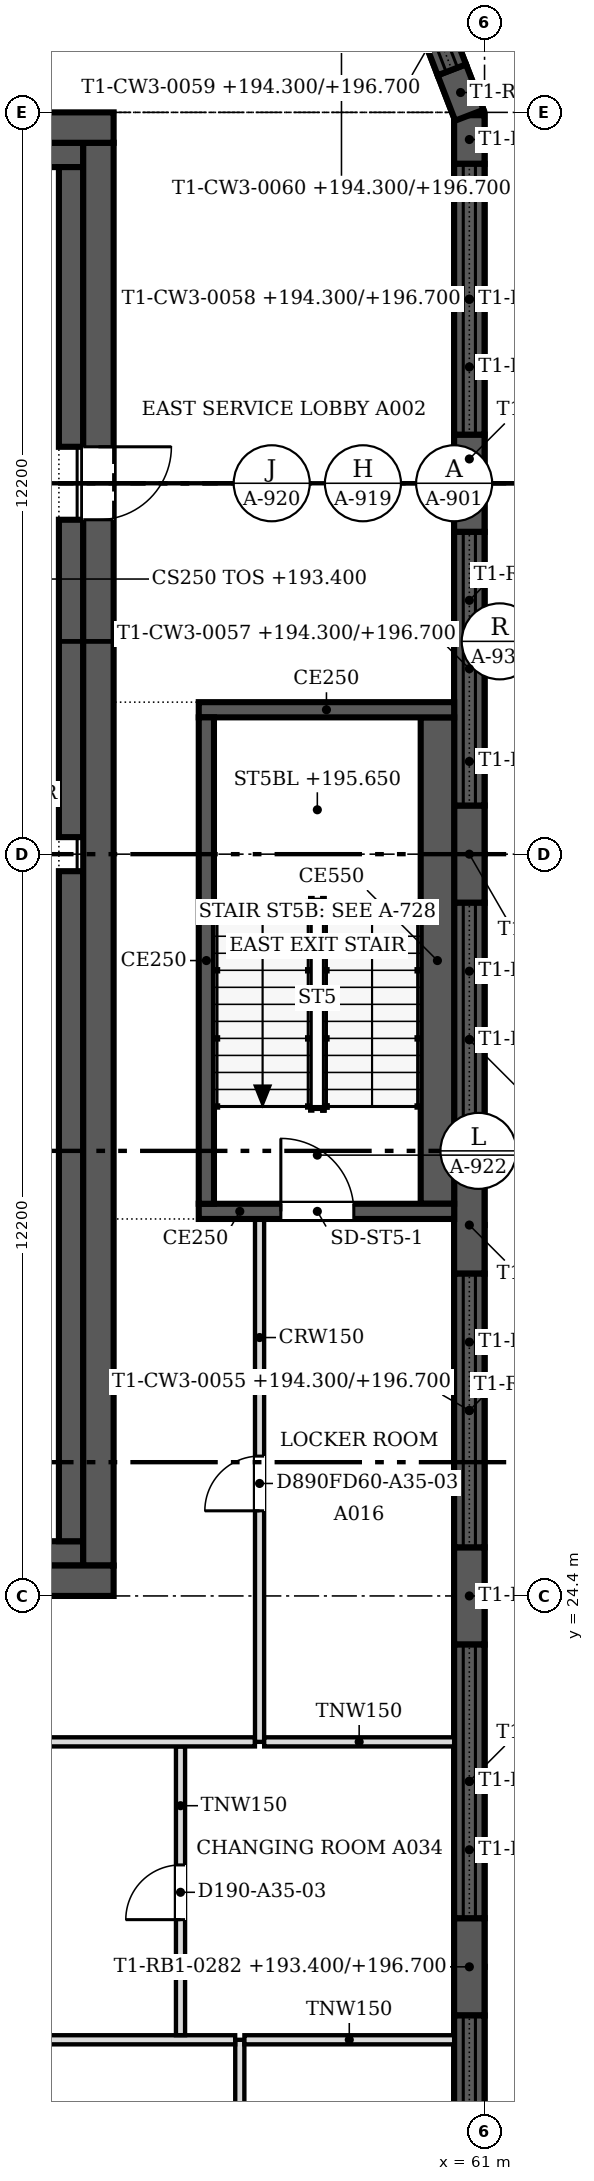
"""IFC4 building model, lengths in metres.
Left out: names, types, materials, properties, quantities, classifications, styles, units other than length and angle.
Written with IfcOpenShell. Run it as: python <this file> out.ifc"""

import sys

from ifc_helpers import new_model, si_unit, direction, frame, frame_2d, origin, place, context, subcontext, project, spatial, polyline, rectangle, outline, extrude, faceted_brep, source, transform, mapped, element, fill, save


model = new_model("IFC4")
c1 = context("Model", 3, precision=1e-05, world=origin(), true_north=direction((0.0, 1.0)))
c2 = subcontext(c1, "Body", "Model", "MODEL_VIEW")
j1 = project(units=[si_unit("LENGTHUNIT", "METRE"), si_unit("PLANEANGLEUNIT", "RADIAN")], contexts=[c1])
p1 = place(None, origin())
s1 = spatial("IfcSite", under=j1, at=p1, CompositionType="ELEMENT")
p2 = place(p1, origin())
s2 = spatial("IfcBuilding", under=s1, at=p2, CompositionType="ELEMENT")
p3 = place(p2, frame((0.0, 0.0, 193.4)))
s3 = spatial("IfcBuildingStorey", under=s2, at=p3, CompositionType="ELEMENT", Elevation=193.4)
m1 = source(origin(), c2, "Body", "SweptSolid", [
    extrude(outline(polyline([(0.0, 0.0), (1.6, 0.0), (1.6, 3.3), (0.0, 3.3), (0.0, 0.0)])), frame((0.0, 0.25, 0.0), z_axis=(0.0, -1.0, 0.0), x_axis=(1.0, 0.0, 0.0)), (0.0, 0.0, 1.0), 0.5),
])
p4 = place(p3, frame((60.75, 17.5, 0.0), z_axis=(0.0, 0.0, 1.0), x_axis=(0.0, 1.0, 0.0)))
e1 = element("IfcWall", 1, at=p4, inside=s3, PredefinedType="SOLIDWALL", context=c2, shape_type="MappedRepresentation", body=[
    mapped(m1, transform((0.0, 0.0, 0.0), scale=1.0)),
])
m2 = source(origin(), c2, "Body", "Brep", [
    faceted_brep([(0.0, -0.25, 0.0), (1.6, -0.25, 0.0), (1.6, -0.25, 3.3), (0.0, -0.25, 3.3), (0.0, 0.25, 3.3), (1.6, 0.25, 3.3), (1.6, 0.25, 0.0), (0.0, 0.25, 0.0)], [[[0, 1, 2, 3]], [[4, 5, 6, 7]], [[7, 6, 1, 0]], [[5, 4, 3, 2]], [[4, 7, 0, 3]], [[1, 6, 5, 2]]]),
])
p5 = place(p3, frame((60.75, 23.6, 0.0), z_axis=(0.0, 0.0, 1.0), x_axis=(0.0, 1.0, 0.0)))
e2 = element("IfcWall", 2, at=p5, inside=s3, PredefinedType="SOLIDWALL", context=c2, shape_type="MappedRepresentation", body=[
    mapped(m2, transform((0.0, 0.0, 0.0), scale=1.0)),
])
p6 = place(p3, frame((60.75, 29.7, 0.0), z_axis=(0.0, 0.0, 1.0), x_axis=(0.0, 1.0, 0.0)))
e3 = element("IfcWall", 3, at=p6, inside=s3, PredefinedType="SOLIDWALL", context=c2, shape_type="MappedRepresentation", body=[
    mapped(m1, transform((0.0, 0.0, 0.0), scale=1.0)),
])
p7 = place(p3, frame((60.75, 35.8, 0.0), z_axis=(0.0, 0.0, 1.0), x_axis=(0.0, 1.0, 0.0)))
e4 = element("IfcWall", 4, at=p7, inside=s3, PredefinedType="SOLIDWALL", context=c2, shape_type="MappedRepresentation", body=[
    mapped(m2, transform((0.0, 0.0, 0.0), scale=1.0)),
])
p8 = place(p3, frame((60.75, 41.9, 0.0), z_axis=(0.0, 0.0, 1.0), x_axis=(0.0, 1.0, 0.0)))
e5 = element("IfcWall", 5, at=p8, inside=s3, PredefinedType="SOLIDWALL", context=c2, shape_type="MappedRepresentation", body=[
    mapped(m1, transform((0.0, 0.0, 0.0), scale=1.0)),
])
m3 = source(origin(), c2, "Body", "Brep", [
    faceted_brep([(0.0, -0.25, 0.0), (0.8, -0.25, 0.0), (0.8, -0.25, 3.3), (0.0, -0.25, 3.3), (0.0, 0.25, 3.3), (0.753, 0.25, 3.3), (0.753, 0.25, 0.0), (0.0, 0.25, 0.0), (0.8, -0.0, 0.0), (0.8, -0.0, 3.3)], [[[0, 1, 2, 3]], [[4, 5, 6, 7]], [[7, 6, 8, 1, 0]], [[9, 2, 1, 8]], [[5, 4, 3, 2, 9]], [[4, 7, 0, 3]], [[8, 6, 5, 9]]]),
])
p9 = place(p3, frame((60.75, 47.953, 0.0), z_axis=(0.0, 0.0, 1.0), x_axis=(0.0, 1.0, 0.0)))
e6 = element("IfcWall", 6, at=p9, inside=s3, PredefinedType="SOLIDWALL", context=c2, shape_type="MappedRepresentation", body=[
    mapped(m3, transform((0.0, 0.0, 0.0), scale=1.0)),
])
m4 = source(origin(), c2, "Body", "SweptSolid", [
    extrude(outline(polyline([(0.0, 0.0), (4.5, 0.0), (4.5, 0.9), (0.0, 0.9), (0.0, 0.0)])), frame((0.0, 0.25, 0.0), z_axis=(0.0, -1.0, 0.0), x_axis=(1.0, 0.0, 0.0)), (0.0, 0.0, 1.0), 0.5),
])
p10 = place(p3, frame((60.75, 13.0, 0.0), z_axis=(0.0, 0.0, 1.0), x_axis=(0.0, 1.0, 0.0)))
e7 = element("IfcWall", 7, at=p10, inside=s3, PredefinedType="SOLIDWALL", context=c2, shape_type="MappedRepresentation", body=[
    mapped(m4, transform((0.0, 0.0, 0.0), scale=1.0)),
])
m5 = source(origin(), c2, "Body", "SweptSolid", [
    extrude(outline(polyline([(0.0, 0.0), (6.1, 0.0), (6.1, 1.2), (0.0, 1.2), (0.0, 0.0)])), frame((0.0, 0.25, 0.0), z_axis=(0.0, -1.0, 0.0), x_axis=(1.0, 0.0, 0.0)), (0.0, 0.0, 1.0), 0.5),
])
p11 = place(p3, frame((60.75, 12.2, 3.3), z_axis=(0.0, 0.0, 1.0), x_axis=(0.0, 1.0, 0.0)))
e8 = element("IfcWall", 8, at=p11, inside=s3, PredefinedType="SOLIDWALL", context=c2, shape_type="MappedRepresentation", body=[
    mapped(m5, transform((0.0, 0.0, 0.0), scale=1.0)),
])
p12 = place(p3, frame((60.75, 19.1, 0.0), z_axis=(0.0, 0.0, 1.0), x_axis=(0.0, 1.0, 0.0)))
e9 = element("IfcWall", 9, at=p12, inside=s3, PredefinedType="SOLIDWALL", context=c2, shape_type="MappedRepresentation", body=[
    mapped(m4, transform((0.0, 0.0, 0.0), scale=1.0)),
])
m6 = source(origin(), c2, "Body", "Brep", [
    faceted_brep([(0.0, -0.25, 0.0), (6.1, -0.25, 0.0), (6.1, -0.25, 1.2), (0.0, -0.25, 1.2), (0.0, 0.25, 1.2), (6.1, 0.25, 1.2), (6.1, 0.25, 0.0), (0.0, 0.25, 0.0)], [[[0, 1, 2, 3]], [[4, 5, 6, 7]], [[7, 6, 1, 0]], [[5, 4, 3, 2]], [[4, 7, 0, 3]], [[1, 6, 5, 2]]]),
])
p13 = place(p3, frame((60.75, 18.3, 3.3), z_axis=(0.0, 0.0, 1.0), x_axis=(0.0, 1.0, 0.0)))
e10 = element("IfcWall", 10, at=p13, inside=s3, PredefinedType="SOLIDWALL", context=c2, shape_type="MappedRepresentation", body=[
    mapped(m6, transform((0.0, 0.0, 0.0), scale=1.0)),
])
p14 = place(p3, frame((60.75, 25.2, 0.0), z_axis=(0.0, 0.0, 1.0), x_axis=(0.0, 1.0, 0.0)))
e11 = element("IfcWall", 11, at=p14, inside=s3, PredefinedType="SOLIDWALL", context=c2, shape_type="MappedRepresentation", body=[
    mapped(m4, transform((0.0, 0.0, 0.0), scale=1.0)),
])
p15 = place(p3, frame((60.75, 24.4, 3.3), z_axis=(0.0, 0.0, 1.0), x_axis=(0.0, 1.0, 0.0)))
e12 = element("IfcWall", 12, at=p15, inside=s3, PredefinedType="SOLIDWALL", context=c2, shape_type="MappedRepresentation", body=[
    mapped(m5, transform((0.0, 0.0, 0.0), scale=1.0)),
])
p16 = place(p3, frame((60.75, 31.3, 0.0), z_axis=(0.0, 0.0, 1.0), x_axis=(0.0, 1.0, 0.0)))
e13 = element("IfcWall", 13, at=p16, inside=s3, PredefinedType="SOLIDWALL", context=c2, shape_type="MappedRepresentation", body=[
    mapped(m4, transform((0.0, 0.0, 0.0), scale=1.0)),
])
p17 = place(p3, frame((60.75, 30.5, 3.3), z_axis=(0.0, 0.0, 1.0), x_axis=(0.0, 1.0, 0.0)))
e14 = element("IfcWall", 14, at=p17, inside=s3, PredefinedType="SOLIDWALL", context=c2, shape_type="MappedRepresentation", body=[
    mapped(m5, transform((0.0, 0.0, 0.0), scale=1.0)),
])
p18 = place(p3, frame((60.75, 37.4, 0.0), z_axis=(0.0, 0.0, 1.0), x_axis=(0.0, 1.0, 0.0)))
e15 = element("IfcWall", 15, at=p18, inside=s3, PredefinedType="SOLIDWALL", context=c2, shape_type="MappedRepresentation", body=[
    mapped(m4, transform((0.0, 0.0, 0.0), scale=1.0)),
])
p19 = place(p3, frame((60.75, 36.6, 3.3), z_axis=(0.0, 0.0, 1.0), x_axis=(0.0, 1.0, 0.0)))
e16 = element("IfcWall", 16, at=p19, inside=s3, PredefinedType="SOLIDWALL", context=c2, shape_type="MappedRepresentation", body=[
    mapped(m6, transform((0.0, 0.0, 0.0), scale=1.0)),
])
m7 = source(origin(), c2, "Body", "SweptSolid", [
    extrude(outline(polyline([(0.0, 0.0), (4.453, 0.0), (4.453, 0.9), (0.0, 0.9), (0.0, 0.0)])), frame((0.0, 0.25, 0.0), z_axis=(0.0, -1.0, 0.0), x_axis=(1.0, 0.0, 0.0)), (0.0, 0.0, 1.0), 0.5),
])
p20 = place(p3, frame((60.75, 43.5, 0.0), z_axis=(0.0, 0.0, 1.0), x_axis=(0.0, 1.0, 0.0)))
e17 = element("IfcWall", 17, at=p20, inside=s3, PredefinedType="SOLIDWALL", context=c2, shape_type="MappedRepresentation", body=[
    mapped(m7, transform((0.0, 0.0, 0.0), scale=1.0)),
])
m8 = source(origin(), c2, "Body", "Brep", [
    faceted_brep([(0.0, -0.25, 0.0), (6.053, -0.25, 0.0), (6.053, -0.25, 1.2), (0.0, -0.25, 1.2), (0.0, 0.25, 1.2), (6.007, 0.25, 1.2), (6.007, 0.25, 0.0), (0.0, 0.25, 0.0), (6.053, 0.0, 0.0), (6.053, 0.0, 1.2)], [[[0, 1, 2, 3]], [[4, 5, 6, 7]], [[7, 6, 8, 1, 0]], [[9, 2, 1, 8]], [[5, 4, 3, 2, 9]], [[4, 7, 0, 3]], [[8, 6, 5, 9]]]),
])
p21 = place(p3, frame((60.75, 42.7, 3.3), z_axis=(0.0, 0.0, 1.0), x_axis=(0.0, 1.0, 0.0)))
e18 = element("IfcWall", 18, at=p21, inside=s3, PredefinedType="SOLIDWALL", context=c2, shape_type="MappedRepresentation", body=[
    mapped(m8, transform((0.0, 0.0, 0.0), scale=1.0)),
])
m9 = source(origin(), c2, "Body", "Brep", [
    faceted_brep([(0.0, -0.25, 0.0), (0.8, -0.25, 0.0), (0.8, -0.25, 3.3), (0.0, -0.25, 3.3), (0.047, 0.25, 3.3), (0.8, 0.25, 3.3), (0.8, 0.25, 0.0), (0.047, 0.25, 0.0), (0.0, 0.0, 0.0), (0.0, 0.0, 3.3)], [[[0, 1, 2, 3]], [[4, 5, 6, 7]], [[7, 6, 1, 0, 8]], [[5, 4, 9, 3, 2]], [[8, 0, 3, 9]], [[7, 8, 9, 4]], [[1, 6, 5, 2]]]),
])
p22 = place(p3, frame((60.75, 48.753, 0.0), z_axis=(0.0, 0.0, 1.0), x_axis=(-0.359735468129, 0.933054335486, 0.0)))
e19 = element("IfcWall", 19, at=p22, inside=s3, PredefinedType="SOLIDWALL", context=c2, shape_type="MappedRepresentation", body=[
    mapped(m9, transform((0.0, 0.0, 0.0), scale=1.0)),
])
m10 = source(origin(), c2, "Body", "SweptSolid", [
    extrude(outline(polyline([(0.0, 0.0), (1.351, 0.0), (1.351, 0.9), (0.0, 0.9), (0.0, 0.0)])), frame((0.0, 0.25, 0.0), z_axis=(0.0, -1.0, 0.0), x_axis=(1.0, 0.0, 0.0)), (0.0, 0.0, 1.0), 0.5),
])
p23 = place(p3, frame((60.462, 49.5, 0.0), z_axis=(0.0, 0.0, 1.0), x_axis=(-0.359923772835, 0.932981713512, 0.0)))
e20 = element("IfcWall", 20, at=p23, inside=s3, PredefinedType="SOLIDWALL", context=c2, shape_type="MappedRepresentation", body=[
    mapped(m10, transform((0.0, 0.0, 0.0), scale=1.0)),
])
m11 = source(origin(), c2, "Body", "Brep", [
    faceted_brep([(0.0, -0.25, 0.0), (2.95, -0.25, 0.0), (2.95, -0.25, 1.2), (0.0, -0.25, 1.2), (0.047, 0.25, 1.2), (2.898, 0.25, 1.2), (2.898, 0.25, 0.0), (0.047, 0.25, 0.0), (2.95, 0.0, 0.0), (0.0, 0.0, 0.0), (2.95, 0.0, 1.2), (0.0, 0.0, 1.2)], [[[0, 1, 2, 3]], [[4, 5, 6, 7]], [[7, 6, 8, 1, 0, 9]], [[10, 2, 1, 8]], [[5, 4, 11, 3, 2, 10]], [[9, 0, 3, 11]], [[7, 9, 11, 4]], [[8, 6, 5, 10]]]),
])
p24 = place(p3, frame((60.75, 48.753, 3.3), z_axis=(0.0, 0.0, 1.0), x_axis=(-0.359877213415, 0.932999673775, 0.0)))
e21 = element("IfcWall", 21, at=p24, inside=s3, PredefinedType="SOLIDWALL", context=c2, shape_type="MappedRepresentation", body=[
    mapped(m11, transform((0.0, 0.0, 0.0), scale=1.0)),
])
p25 = place(p3, frame((54.9, 24.65, 0.0), z_axis=(0.0, 0.0, 1.0), x_axis=(-1.0, 0.0, 0.0)))
e22 = element("IfcWall", 22, at=p25, inside=s3, PredefinedType="SHEAR", context=c2, shape_type="SweptSolid", body=[
    extrude(rectangle(XDim=24.4, YDim=0.5, at=frame_2d((12.2, 0.0))), origin(), (0.0, 0.0, 1.0), 4.5),
])
m12 = source(origin(), c2, "Body", "SweptSolid", [
    extrude(rectangle(XDim=1.2, YDim=2.1, at=frame_2d((0.6, 1.05))), frame((0.0, 0.26, 0.0), z_axis=(0.0, -1.0, 0.0), x_axis=(1.0, 0.0, 0.0)), (0.0, 0.0, 1.0), 0.52),
])
p26 = place(p25, frame((1.5, 0.0, 0.0)))
e23 = element("IfcOpeningElement", 23, at=p26, cuts=e22, PredefinedType="OPENING", context=c2, shape_type="MappedRepresentation", body=[
    mapped(m12, transform((0.0, 0.0, 0.0), scale=1.0)),
])
p27 = place(p3, frame((30.5, 48.55, 0.0), z_axis=(0.0, 0.0, 1.0), x_axis=(1.0, 0.0, 0.0)))
e24 = element("IfcWall", 24, at=p27, inside=s3, PredefinedType="SHEAR", context=c2, shape_type="SweptSolid", body=[
    extrude(rectangle(XDim=24.4, YDim=0.5, at=frame_2d((12.2, 0.0))), origin(), (0.0, 0.0, 1.0), 4.5),
])
p28 = place(p3, frame((54.65, 48.3, 0.0), z_axis=(0.0, 0.0, 1.0), x_axis=(0.0, -1.0, 0.0)))
e25 = element("IfcWall", 25, at=p28, inside=s3, PredefinedType="SHEAR", context=c2, shape_type="SweptSolid", body=[
    extrude(rectangle(XDim=23.4, YDim=0.5, at=frame_2d((11.7, 0.0))), origin(), (0.0, 0.0, 1.0), 4.5),
])
p29 = place(p28, frame((5.0, 0.0, 0.0)))
e26 = element("IfcOpeningElement", 26, at=p29, cuts=e25, PredefinedType="OPENING", context=c2, shape_type="MappedRepresentation", body=[
    mapped(m12, transform((0.0, 0.0, 0.0), scale=1.0)),
])
p30 = place(p3, frame((53.4, 25.1, 0.0), z_axis=(0.0, 0.0, 1.0), x_axis=(1.0, 0.0, 0.0)))
e27 = element("IfcWall", 27, at=p30, inside=s3, PredefinedType="SOLIDWALL", context=c2, shape_type="SweptSolid", body=[
    extrude(rectangle(XDim=1.0, YDim=0.4, at=frame_2d((0.5, 0.0))), origin(), (0.0, 0.0, 1.0), 4.5),
])
p31 = place(p3, frame((31.0, 48.1, 0.0), z_axis=(0.0, 0.0, 1.0), x_axis=(1.0, 0.0, 0.0)))
e28 = element("IfcWall", 28, at=p31, inside=s3, PredefinedType="SOLIDWALL", context=c2, shape_type="SweptSolid", body=[
    extrude(rectangle(XDim=23.4, YDim=0.4, at=frame_2d((11.7, 0.0))), origin(), (0.0, 0.0, 1.0), 4.5),
])
p32 = place(p3, frame((54.2, 25.3, 0.0), z_axis=(0.0, 0.0, 1.0), x_axis=(0.0, 1.0, 0.0)))
e29 = element("IfcWall", 29, at=p32, inside=s3, PredefinedType="SOLIDWALL", context=c2, shape_type="SweptSolid", body=[
    extrude(rectangle(XDim=11.02, YDim=0.4, at=frame_2d((5.51, 0.0))), origin(), (0.0, 0.0, 1.0), 4.5),
])
p33 = place(p3, frame((54.2, 36.88, 0.0), z_axis=(0.0, 0.0, 1.0), x_axis=(0.0, 1.0, 0.0)))
e30 = element("IfcWall", 30, at=p33, inside=s3, PredefinedType="SOLIDWALL", context=c2, shape_type="SweptSolid", body=[
    extrude(rectangle(XDim=5.22, YDim=0.4, at=frame_2d((2.61, 0.0))), origin(), (0.0, 0.0, 1.0), 4.5),
])
p34 = place(p3, frame((54.2, 43.3, 0.0), z_axis=(0.0, 0.0, 1.0), x_axis=(0.0, 1.0, 0.0)))
e31 = element("IfcWall", 31, at=p34, inside=s3, PredefinedType="SOLIDWALL", context=c2, shape_type="SweptSolid", body=[
    extrude(rectangle(XDim=4.6, YDim=0.4, at=frame_2d((2.3, 0.0))), origin(), (0.0, 0.0, 1.0), 4.5),
])
p35 = place(p3, frame((60.5, 30.725, 0.0), z_axis=(0.0, 0.0, 1.0), x_axis=(-1.0, 0.0, 0.0)))
e32 = element("IfcWall", 32, at=p35, inside=s3, PredefinedType="SOLIDWALL", context=c2, shape_type="SweptSolid", body=[
    extrude(rectangle(XDim=4.2, YDim=0.25, at=frame_2d((2.1, 0.0))), origin(), (0.0, 0.0, 1.0), 4.5),
])
m13 = source(origin(), c2, "Body", "SweptSolid", [
    extrude(rectangle(XDim=1.2, YDim=2.1, at=frame_2d((0.6, 1.05))), frame((0.0, 0.135, 0.0), z_axis=(0.0, -1.0, 0.0), x_axis=(1.0, 0.0, 0.0)), (0.0, 0.0, 1.0), 0.27),
])
p36 = place(p35, frame((1.65, 0.0, 0.0)))
e33 = element("IfcOpeningElement", 33, at=p36, cuts=e32, PredefinedType="OPENING", context=c2, shape_type="MappedRepresentation", body=[
    mapped(m13, transform((0.0, 0.0, 0.0), scale=1.0)),
])
p37 = place(p3, frame((56.425, 30.85, 0.0), z_axis=(0.0, 0.0, 1.0), x_axis=(0.0, 1.0, 0.0)))
e34 = element("IfcWall", 34, at=p37, inside=s3, PredefinedType="SOLIDWALL", context=c2, shape_type="SweptSolid", body=[
    extrude(rectangle(XDim=8.0, YDim=0.25, at=frame_2d((4.0, 0.0))), origin(), (0.0, 0.0, 1.0), 4.5),
])
p38 = place(p3, frame((56.3, 38.975, 0.0), z_axis=(0.0, 0.0, 1.0), x_axis=(1.0, 0.0, 0.0)))
e35 = element("IfcWall", 35, at=p38, inside=s3, PredefinedType="SOLIDWALL", context=c2, shape_type="SweptSolid", body=[
    extrude(rectangle(XDim=4.2, YDim=0.25, at=frame_2d((2.1, 0.0))), origin(), (0.0, 0.0, 1.0), 4.5),
])
p39 = place(p3, frame((60.225, 38.85, 0.0), z_axis=(0.0, 0.0, 1.0), x_axis=(0.0, -1.0, 0.0)))
e36 = element("IfcWall", 36, at=p39, inside=s3, PredefinedType="SOLIDWALL", context=c2, shape_type="SweptSolid", body=[
    extrude(rectangle(XDim=8.0, YDim=0.55, at=frame_2d((4.0, 0.0))), origin(), (0.0, 0.0, 1.0), 4.5),
])
p40 = place(p3, frame((56.975, 17.1, 0.0), z_axis=(0.0, 0.0, 1.0), x_axis=(0.0, -1.0, 0.0)))
e37 = element("IfcWall", 37, at=p40, inside=s3, PredefinedType="PARTITIONING", context=c2, shape_type="SweptSolid", body=[
    extrude(rectangle(XDim=9.0, YDim=0.15, at=frame_2d((4.5, 0.0))), origin(), (0.0, 0.0, 1.0), 3.767),
])
m14 = source(origin(), c2, "Body", "SweptSolid", [
    extrude(rectangle(XDim=1.0, YDim=2.1, at=frame_2d((0.5, 1.05))), frame((0.0, 0.085, 0.0), z_axis=(0.0, -1.0, 0.0), x_axis=(1.0, 0.0, 0.0)), (0.0, 0.0, 1.0), 0.17),
])
p41 = place(p40, frame((4.0, 0.0, 0.0)))
e38 = element("IfcOpeningElement", 38, at=p41, cuts=e37, PredefinedType="OPENING", context=c2, shape_type="MappedRepresentation", body=[
    mapped(m14, transform((0.0, 0.0, 0.0), scale=1.0)),
])
p42 = place(p3, frame((46.476, 17.1, 0.0), z_axis=(0.0, 0.0, 1.0), x_axis=(1.0, 0.0, 0.0)))
e39 = element("IfcWall", 39, at=p42, inside=s3, PredefinedType="PARTITIONING", context=c2, shape_type="SweptSolid", body=[
    extrude(rectangle(XDim=10.423, YDim=0.15, at=frame_2d((5.211, 0.0))), origin(), (0.0, 0.0, 1.0), 3.767),
])
p43 = place(p3, frame((57.051, 17.1, 0.0), z_axis=(0.0, 0.0, 1.0), x_axis=(1.0, 0.0, 0.0)))
e40 = element("IfcWall", 40, at=p43, inside=s3, PredefinedType="PARTITIONING", context=c2, shape_type="SweptSolid", body=[
    extrude(rectangle(XDim=3.449, YDim=0.15, at=frame_2d((1.725, 0.0))), origin(), (0.0, 0.0, 1.0), 3.767),
])
p44 = place(p3, frame((56.0, 21.924, 0.0), z_axis=(0.0, 0.0, 1.0), x_axis=(0.0, -1.0, 0.0)))
e41 = element("IfcWall", 41, at=p44, inside=s3, PredefinedType="PARTITIONING", context=c2, shape_type="SweptSolid", body=[
    extrude(rectangle(XDim=4.748, YDim=0.15, at=frame_2d((2.374, 0.0))), origin(), (0.0, 0.0, 1.0), 3.767),
])
m15 = source(origin(), c2, "Body", "SweptSolid", [
    extrude(rectangle(XDim=0.9, YDim=2.1, at=frame_2d((0.45, 1.05))), frame((0.0, 0.085, 0.0), z_axis=(0.0, -1.0, 0.0), x_axis=(1.0, 0.0, 0.0)), (0.0, 0.0, 1.0), 0.17),
])
p45 = place(p44, frame((1.948, 0.0, 0.0)))
e42 = element("IfcOpeningElement", 42, at=p45, cuts=e41, PredefinedType="OPENING", context=c2, shape_type="MappedRepresentation", body=[
    mapped(m15, transform((0.0, 0.0, 0.0), scale=1.0)),
])
p46 = place(p3, frame((46.4, 22.0, 0.0), z_axis=(0.0, 0.0, 1.0), x_axis=(1.0, 0.0, 0.0)))
e43 = element("IfcWall", 43, at=p46, inside=s3, PredefinedType="PARTITIONING", context=c2, shape_type="SweptSolid", body=[
    extrude(rectangle(XDim=10.824, YDim=0.15, at=frame_2d((5.412, 0.0))), origin(), (0.0, 0.0, 1.0), 3.767),
])
p47 = place(p3, frame((57.3, 30.6, 0.0), z_axis=(0.0, 0.0, 1.0), x_axis=(0.0, -1.0, 0.0)))
e44 = element("IfcWall", 44, at=p47, inside=s3, PredefinedType="PARTITIONING", context=c2, shape_type="SweptSolid", body=[
    extrude(rectangle(XDim=8.6, YDim=0.15, at=frame_2d((4.3, 0.0))), origin(), (0.0, 0.0, 1.0), 3.767),
])
p48 = place(p47, frame((3.9, 0.0, 0.0)))
e45 = element("IfcOpeningElement", 45, at=p48, cuts=e44, PredefinedType="OPENING", context=c2, shape_type="MappedRepresentation", body=[
    mapped(m15, transform((0.0, 0.0, 0.0), scale=1.0)),
])
p49 = place(p3, frame((57.376, 22.0, 0.0), z_axis=(0.0, 0.0, 1.0), x_axis=(1.0, 0.0, 0.0)))
e46 = element("IfcWall", 46, at=p49, inside=s3, PredefinedType="PARTITIONING", context=c2, shape_type="SweptSolid", body=[
    extrude(rectangle(XDim=3.124, YDim=0.15, at=frame_2d((1.562, 0.0))), origin(), (0.0, 0.0, 1.0), 3.767),
])
m16 = source(origin(), c2, "Body", "SweptSolid", [
    extrude(rectangle(XDim=1.2, YDim=2.1, at=frame_2d((0.6, 1.05))), frame((0.0, 0.025, 0.0), z_axis=(0.0, -1.0, 0.0), x_axis=(1.0, 0.0, 0.0)), (0.0, 0.0, 1.0), 0.05),
])
p50 = place(p29, origin())
e47 = element("IfcDoor", 47, at=p50, inside=s3, OperationType="SINGLE_SWING_LEFT", PredefinedType="DOOR", context=c2, shape_type="MappedRepresentation", body=[
    mapped(m16, transform((0.0, 0.0, 0.0), scale=1.0)),
])
fill(e26, e47)
p51 = place(p36, origin())
e48 = element("IfcDoor", 48, at=p51, inside=s3, OperationType="SINGLE_SWING_RIGHT", PredefinedType="DOOR", context=c2, shape_type="MappedRepresentation", body=[
    mapped(m16, transform((0.0, 0.0, 0.0), scale=1.0)),
])
fill(e33, e48)
m17 = source(origin(), c2, "Body", "SweptSolid", [
    extrude(rectangle(XDim=0.9, YDim=2.1, at=frame_2d((0.45, 1.05))), frame((0.0, 0.025, 0.0), z_axis=(0.0, -1.0, 0.0), x_axis=(1.0, 0.0, 0.0)), (0.0, 0.0, 1.0), 0.05),
])
p52 = place(p45, origin())
e49 = element("IfcDoor", 49, at=p52, inside=s3, OperationType="SINGLE_SWING_RIGHT", PredefinedType="DOOR", context=c2, shape_type="MappedRepresentation", body=[
    mapped(m17, transform((0.0, 0.0, 0.0), scale=1.0)),
])
fill(e42, e49)
p53 = place(p48, origin())
e50 = element("IfcDoor", 50, at=p53, inside=s3, OperationType="SINGLE_SWING_RIGHT", PredefinedType="DOOR", context=c2, shape_type="MappedRepresentation", body=[
    mapped(m17, transform((0.0, 0.0, 0.0), scale=1.0)),
])
fill(e45, e50)
save(model, sys.argv[1])
